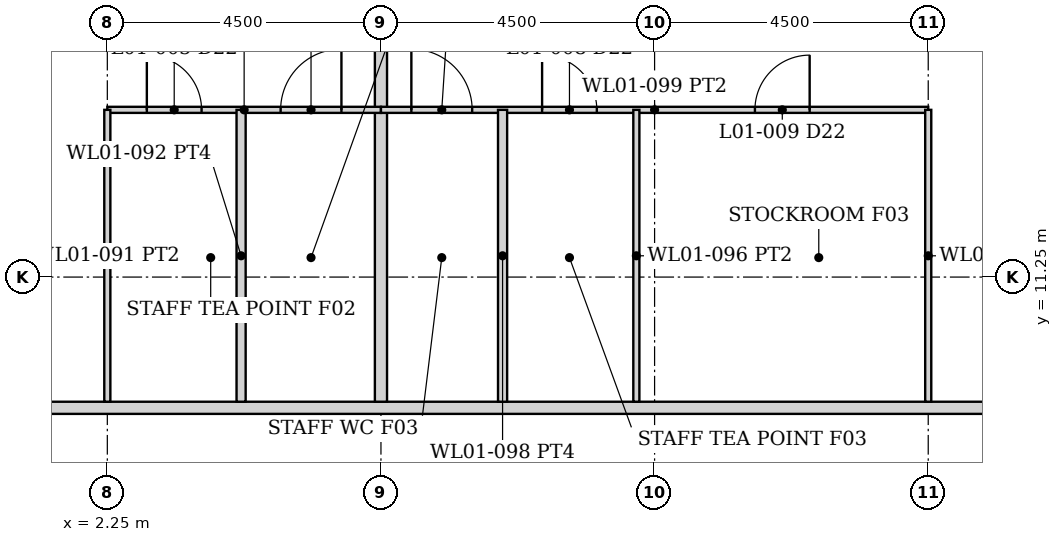
"""IFC4 building model, lengths in metres.
Left out: names, types, materials, properties, quantities, classifications, styles, units other than length and angle.
Written with IfcOpenShell. Run it as: python <this file> out.ifc"""

import sys

from ifc_helpers import new_model, si_unit, direction, frame, frame_2d, origin, place, context, subcontext, project, spatial, rectangle, extrude, element, fill, save


model = new_model("IFC4")
c1 = context("Model", 3, precision=1e-05, world=origin(), true_north=direction((0.0, 1.0)))
c2 = subcontext(c1, "Body", "Model", "MODEL_VIEW")
j1 = project(units=[si_unit("LENGTHUNIT", "METRE"), si_unit("PLANEANGLEUNIT", "RADIAN")], contexts=[c1])
p1 = place(None, origin())
s1 = spatial("IfcSite", under=j1, at=p1, CompositionType="ELEMENT")
p2 = place(p1, origin())
s2 = spatial("IfcBuilding", under=s1, at=p2, CompositionType="ELEMENT")
p3 = place(p2, frame((0.0, 0.0, 6.0)))
s3 = spatial("IfcBuildingStorey", under=s2, at=p3, CompositionType="ELEMENT", Elevation=6.0)
p4 = place(p3, frame((-25.075, 9.1, 0.0), z_axis=(0.0, 0.0, 1.0), x_axis=(1.0, 0.0, 0.0)))
e1 = element("IfcWall", 1, at=p4, inside=s3, PredefinedType="PARTITIONING", context=c2, shape_type="SweptSolid", body=[
    extrude(rectangle(XDim=50.15, YDim=0.2, at=frame_2d((25.075, 0.0))), origin(), (0.0, 0.0, 1.0), 3.829),
])
p5 = place(p4, frame((6.85, 0.0, 0.0)))
e2 = element("IfcOpeningElement", 2, at=p5, cuts=e1, PredefinedType="OPENING", context=c2, shape_type="SweptSolid", body=[
    extrude(rectangle(XDim=0.9, YDim=2.1, at=frame_2d((0.45, 1.05))), frame((0.0, 0.11, 0.0), z_axis=(0.0, -1.0, 0.0), x_axis=(1.0, 0.0, 0.0)), (0.0, 0.0, 1.0), 0.22),
])
p6 = place(p4, frame((24.625, 0.0, 0.0)))
e3 = element("IfcOpeningElement", 3, at=p6, cuts=e1, PredefinedType="OPENING", context=c2, shape_type="SweptSolid", body=[
    extrude(rectangle(XDim=0.9, YDim=2.1, at=frame_2d((0.45, 1.05))), frame((0.0, 0.11, 0.0), z_axis=(0.0, -1.0, 0.0), x_axis=(1.0, 0.0, 0.0)), (0.0, 0.0, 1.0), 0.22),
])
p7 = place(p4, frame((42.4, 0.0, 0.0)))
e4 = element("IfcOpeningElement", 4, at=p7, cuts=e1, PredefinedType="OPENING", context=c2, shape_type="SweptSolid", body=[
    extrude(rectangle(XDim=0.9, YDim=2.1, at=frame_2d((0.45, 1.05))), frame((0.0, 0.11, 0.0), z_axis=(0.0, -1.0, 0.0), x_axis=(1.0, 0.0, 0.0)), (0.0, 0.0, 1.0), 0.22),
])
p8 = place(p3, frame((6.75, 9.2, 0.0), z_axis=(0.0, 0.0, 1.0), x_axis=(0.0, 1.0, 0.0)))
e5 = element("IfcWall", 5, at=p8, inside=s3, PredefinedType="PARTITIONING", context=c2, shape_type="SweptSolid", body=[
    extrude(rectangle(XDim=19.889, YDim=0.2, at=frame_2d((9.944, 0.0))), origin(), (0.0, 0.0, 1.0), 3.829),
])
p9 = place(p3, frame((2.25, 14.0, 0.0), z_axis=(0.0, 0.0, 1.0), x_axis=(1.0, 0.0, 0.0)))
e6 = element("IfcWall", 6, at=p9, inside=s3, PredefinedType="PARTITIONING", context=c2, shape_type="SweptSolid", body=[
    extrude(rectangle(XDim=4.5, YDim=0.1, at=frame_2d((2.25, 0.0))), origin(), (0.0, 0.0, 1.0), 3.829),
])
p10 = place(p9, frame((0.65, 0.0, 0.0)))
e7 = element("IfcOpeningElement", 7, at=p10, cuts=e6, PredefinedType="OPENING", context=c2, shape_type="SweptSolid", body=[
    extrude(rectangle(XDim=0.9, YDim=2.1, at=frame_2d((0.45, 1.05))), frame((0.0, 0.06, 0.0), z_axis=(0.0, -1.0, 0.0), x_axis=(1.0, 0.0, 0.0)), (0.0, 0.0, 1.0), 0.12),
])
p11 = place(p9, frame((2.85, 0.0, 0.0)))
e8 = element("IfcOpeningElement", 8, at=p11, cuts=e6, PredefinedType="OPENING", context=c2, shape_type="SweptSolid", body=[
    extrude(rectangle(XDim=1.0, YDim=2.1, at=frame_2d((0.5, 1.05))), frame((0.0, 0.06, 0.0), z_axis=(0.0, -1.0, 0.0), x_axis=(1.0, 0.0, 0.0)), (0.0, 0.0, 1.0), 0.12),
])
p12 = place(p3, frame((2.25, 9.2, 0.0), z_axis=(0.0, 0.0, 1.0), x_axis=(0.0, 1.0, 0.0)))
e9 = element("IfcWall", 9, at=p12, inside=s3, PredefinedType="PARTITIONING", context=c2, shape_type="SweptSolid", body=[
    extrude(rectangle(XDim=4.8, YDim=0.1, at=frame_2d((2.4, 0.0))), origin(), (0.0, 0.0, 1.0), 3.829),
])
p13 = place(p3, frame((4.45, 9.2, 0.0), z_axis=(0.0, 0.0, 1.0), x_axis=(0.0, 1.0, 0.0)))
e10 = element("IfcWall", 10, at=p13, inside=s3, PredefinedType="PARTITIONING", context=c2, shape_type="SweptSolid", body=[
    extrude(rectangle(XDim=4.8, YDim=0.15, at=frame_2d((2.4, 0.0))), origin(), (0.0, 0.0, 1.0), 3.829),
])
p14 = place(p3, frame((6.75, 14.0, 0.0), z_axis=(0.0, 0.0, 1.0), x_axis=(1.0, 0.0, 0.0)))
e11 = element("IfcWall", 11, at=p14, inside=s3, PredefinedType="PARTITIONING", context=c2, shape_type="SweptSolid", body=[
    extrude(rectangle(XDim=9.0, YDim=0.1, at=frame_2d((4.5, 0.0))), origin(), (0.0, 0.0, 1.0), 3.829),
])
p15 = place(p14, frame((6.15, 0.0, 0.0)))
e12 = element("IfcOpeningElement", 12, at=p15, cuts=e11, PredefinedType="OPENING", context=c2, shape_type="SweptSolid", body=[
    extrude(rectangle(XDim=0.9, YDim=2.1, at=frame_2d((0.45, 1.05))), frame((0.0, 0.06, 0.0), z_axis=(0.0, -1.0, 0.0), x_axis=(1.0, 0.0, 0.0)), (0.0, 0.0, 1.0), 0.12),
])
p16 = place(p14, frame((2.65, 0.0, 0.0)))
e13 = element("IfcOpeningElement", 13, at=p16, cuts=e11, PredefinedType="OPENING", context=c2, shape_type="SweptSolid", body=[
    extrude(rectangle(XDim=0.9, YDim=2.1, at=frame_2d((0.45, 1.05))), frame((0.0, 0.06, 0.0), z_axis=(0.0, -1.0, 0.0), x_axis=(1.0, 0.0, 0.0)), (0.0, 0.0, 1.0), 0.12),
])
p17 = place(p14, frame((0.5, 0.0, 0.0)))
e14 = element("IfcOpeningElement", 14, at=p17, cuts=e11, PredefinedType="OPENING", context=c2, shape_type="SweptSolid", body=[
    extrude(rectangle(XDim=1.0, YDim=2.1, at=frame_2d((0.5, 1.05))), frame((0.0, 0.06, 0.0), z_axis=(0.0, -1.0, 0.0), x_axis=(1.0, 0.0, 0.0)), (0.0, 0.0, 1.0), 0.12),
])
p18 = place(p3, frame((8.75, 9.2, 0.0), z_axis=(0.0, 0.0, 1.0), x_axis=(0.0, 1.0, 0.0)))
e15 = element("IfcWall", 15, at=p18, inside=s3, PredefinedType="PARTITIONING", context=c2, shape_type="SweptSolid", body=[
    extrude(rectangle(XDim=4.8, YDim=0.15, at=frame_2d((2.4, 0.0))), origin(), (0.0, 0.0, 1.0), 3.829),
])
for number, where, z_axis, x_axis in (
    (16, (10.95, 9.2, 0.0), (0.0, 0.0, 1.0), (0.0, 1.0, 0.0)),
    (17, (15.75, 9.2, 0.0), (0.0, 0.0, 1.0), (0.0, 1.0, 0.0)),
):
    element("IfcWall", number, at=place(p3, frame(where, z_axis=z_axis, x_axis=x_axis)), inside=s3, PredefinedType="PARTITIONING", context=c2, shape_type="SweptSolid", body=[
        extrude(rectangle(XDim=4.8, YDim=0.1, at=frame_2d((2.4, 0.0))), origin(), (0.0, 0.0, 1.0), 3.829),
    ])
p19 = place(p10, origin())
e18 = element("IfcDoor", 18, at=p19, inside=s3, OperationType="SINGLE_SWING_LEFT", PredefinedType="DOOR", context=c2, shape_type="SweptSolid", body=[
    extrude(rectangle(XDim=0.9, YDim=2.1, at=frame_2d((0.45, 1.05))), frame((0.0, 0.025, 0.0), z_axis=(0.0, -1.0, 0.0), x_axis=(1.0, 0.0, 0.0)), (0.0, 0.0, 1.0), 0.05),
])
fill(e7, e18)
p20 = place(p11, origin())
e19 = element("IfcDoor", 19, at=p20, inside=s3, OperationType="SINGLE_SWING_RIGHT", PredefinedType="DOOR", context=c2, shape_type="SweptSolid", body=[
    extrude(rectangle(XDim=1.0, YDim=2.1, at=frame_2d((0.5, 1.05))), frame((0.0, 0.025, 0.0), z_axis=(0.0, -1.0, 0.0), x_axis=(1.0, 0.0, 0.0)), (0.0, 0.0, 1.0), 0.05),
])
fill(e8, e19)
p21 = place(p15, origin())
e20 = element("IfcDoor", 20, at=p21, inside=s3, OperationType="SINGLE_SWING_RIGHT", PredefinedType="DOOR", context=c2, shape_type="SweptSolid", body=[
    extrude(rectangle(XDim=0.9, YDim=2.1, at=frame_2d((0.45, 1.05))), frame((0.0, 0.025, 0.0), z_axis=(0.0, -1.0, 0.0), x_axis=(1.0, 0.0, 0.0)), (0.0, 0.0, 1.0), 0.05),
])
fill(e12, e20)
p22 = place(p16, origin())
e21 = element("IfcDoor", 21, at=p22, inside=s3, OperationType="SINGLE_SWING_LEFT", PredefinedType="DOOR", context=c2, shape_type="SweptSolid", body=[
    extrude(rectangle(XDim=0.9, YDim=2.1, at=frame_2d((0.45, 1.05))), frame((0.0, 0.025, 0.0), z_axis=(0.0, -1.0, 0.0), x_axis=(1.0, 0.0, 0.0)), (0.0, 0.0, 1.0), 0.05),
])
fill(e13, e21)
p23 = place(p17, origin())
e22 = element("IfcDoor", 22, at=p23, inside=s3, OperationType="SINGLE_SWING_LEFT", PredefinedType="DOOR", context=c2, shape_type="SweptSolid", body=[
    extrude(rectangle(XDim=1.0, YDim=2.1, at=frame_2d((0.5, 1.05))), frame((0.0, 0.025, 0.0), z_axis=(0.0, -1.0, 0.0), x_axis=(1.0, 0.0, 0.0)), (0.0, 0.0, 1.0), 0.05),
])
fill(e14, e22)
save(model, sys.argv[1])
